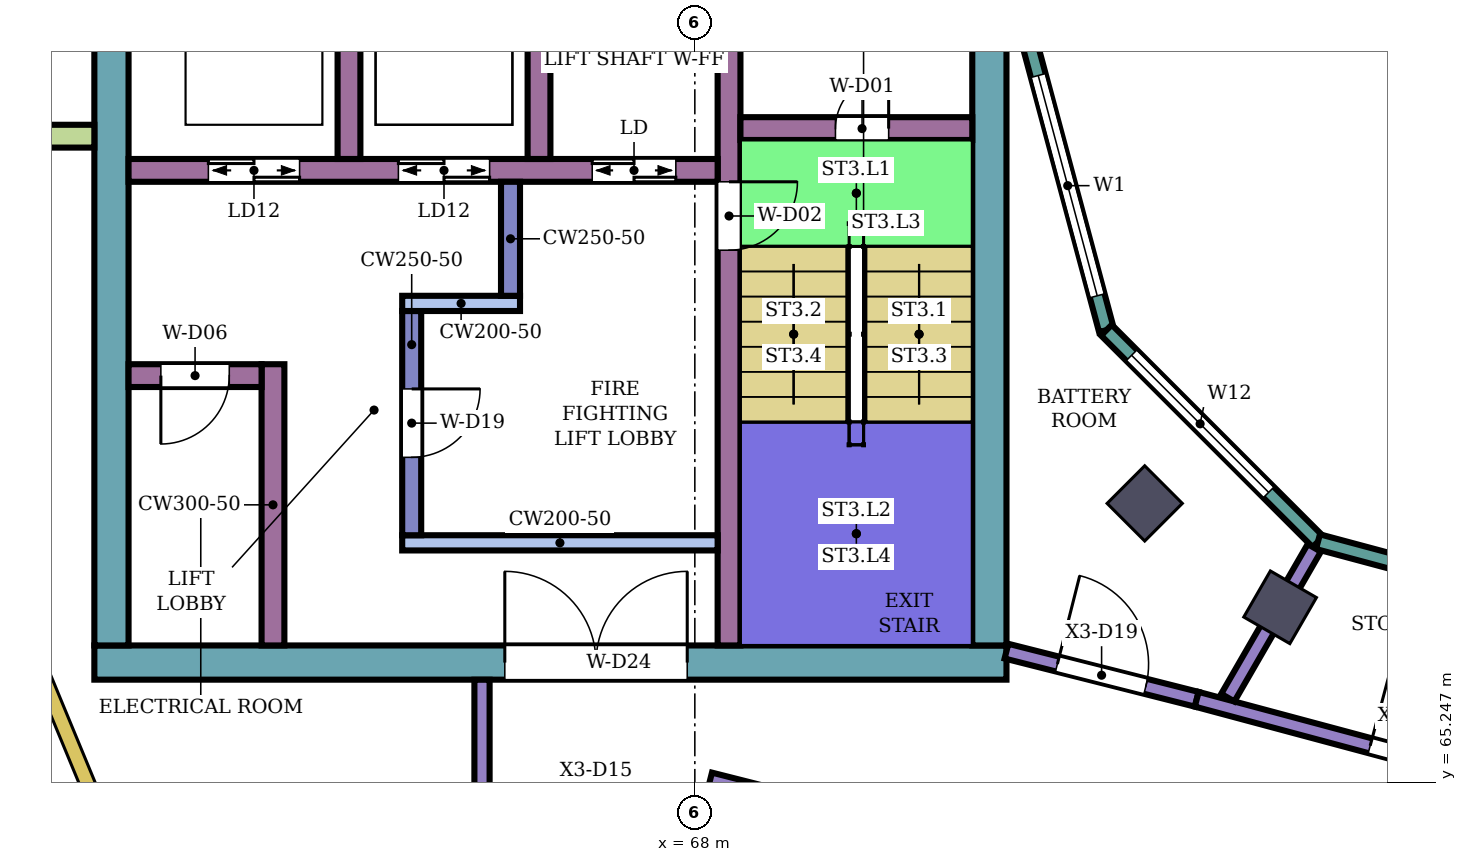
"""IFC4 building model, lengths in metres.
Left out: names, types, materials, properties, quantities, classifications, styles, units other than length and angle.
Written with IfcOpenShell. Run it as: python <this file> out.ifc"""

import sys

from ifc_helpers import new_model, si_unit, direction, frame, frame_2d, origin, origin_2d, place, context, subcontext, project, spatial, rectangle, extrude, element, fill, save


model = new_model("IFC4")
c1 = context("Model", 3, precision=1e-05, world=origin(), true_north=direction((0.0, 1.0)))
c2 = subcontext(c1, "Body", "Model", "MODEL_VIEW")
j1 = project(units=[si_unit("LENGTHUNIT", "METRE"), si_unit("PLANEANGLEUNIT", "RADIAN")], contexts=[c1])
p1 = place(None, origin())
s1 = spatial("IfcSite", under=j1, at=p1, CompositionType="ELEMENT")
p2 = place(p1, origin())
s2 = spatial("IfcBuilding", under=s1, at=p2, CompositionType="ELEMENT")
p3 = place(p2, frame((0.0, 0.0, 309.3)))
s3 = spatial("IfcBuildingStorey", under=s2, at=p3, CompositionType="ELEMENT", Elevation=309.3)
for number, where, z_axis, x_axis in (
    (1, (73.919, 68.919, 0.0), (0.0, 0.0, 1.0), (-0.707, -0.707, 0.0)),
    (2, (75.7, 67.552, 0.0), (0.0, 0.0, 1.0), (-0.5, -0.866, 0.0)),
):
    element("IfcColumn", number, at=place(p3, frame(where, z_axis=z_axis, x_axis=x_axis)), inside=s3, PredefinedType="COLUMN", context=c2, shape_type="SweptSolid", body=[
        extrude(rectangle(XDim=0.7, YDim=0.7, at=origin_2d()), origin(), (0.0, 0.0, 1.0), 5.6),
    ])
p4 = place(p3, frame((72.1, 66.825, 0.0), z_axis=(0.0, 0.0, 1.0), x_axis=(-1.0, 0.0, 0.0)))
e3 = element("IfcWall", 3, at=p4, inside=s3, PredefinedType="SHEAR", context=c2, shape_type="SweptSolid", body=[
    extrude(rectangle(XDim=12.0, YDim=0.45, at=frame_2d((6.0, 0.0))), origin(), (0.0, 0.0, 1.0), 5.28),
])
p5 = place(p4, frame((4.2, 0.0, 0.0)))
e4 = element("IfcOpeningElement", 4, at=p5, cuts=e3, PredefinedType="OPENING", context=c2, shape_type="SweptSolid", body=[
    extrude(rectangle(XDim=2.4, YDim=2.4, at=frame_2d((1.2, 1.2))), frame((0.0, 0.235, 0.0), z_axis=(0.0, -1.0, 0.0), x_axis=(1.0, 0.0, 0.0)), (0.0, 0.0, 1.0), 0.47),
])
p6 = place(p3, frame((71.875, 75.0, 0.0), z_axis=(0.0, 0.0, 1.0), x_axis=(0.0, -1.0, 0.0)))
e5 = element("IfcWall", 5, at=p6, inside=s3, PredefinedType="SHEAR", context=c2, shape_type="SweptSolid", body=[
    extrude(rectangle(XDim=7.95, YDim=0.45, at=frame_2d((3.975, 0.0))), origin(), (0.0, 0.0, 1.0), 5.28),
])
p7 = place(p3, frame((60.325, 76.4, 0.0), z_axis=(0.0, 0.0, 1.0), x_axis=(0.0, -1.0, 0.0)))
e6 = element("IfcWall", 6, at=p7, inside=s3, PredefinedType="SHEAR", context=c2, shape_type="SweptSolid", body=[
    extrude(rectangle(XDim=9.35, YDim=0.45, at=frame_2d((4.675, 0.0))), origin(), (0.0, 0.0, 1.0), 5.28),
])
p8 = place(p3, frame((68.45, 75.0, 0.0), z_axis=(0.0, 0.0, 1.0), x_axis=(0.0, -1.0, 0.0)))
e7 = element("IfcWall", 7, at=p8, inside=s3, PredefinedType="SHEAR", context=c2, shape_type="SweptSolid", body=[
    extrude(rectangle(XDim=7.95, YDim=0.3, at=frame_2d((3.975, 0.0))), origin(), (0.0, 0.0, 1.0), 5.28),
])
p9 = place(p8, frame((1.85, 0.0, 0.0)))
e8 = element("IfcOpeningElement", 8, at=p9, cuts=e7, PredefinedType="OPENING", context=c2, shape_type="SweptSolid", body=[
    extrude(rectangle(XDim=0.9, YDim=2.1, at=frame_2d((0.45, 1.05))), frame((0.0, 0.16, 0.0), z_axis=(0.0, -1.0, 0.0), x_axis=(1.0, 0.0, 0.0)), (0.0, 0.0, 1.0), 0.32),
])
p10 = place(p3, frame((71.65, 73.85, 0.0), z_axis=(0.0, 0.0, 1.0), x_axis=(-1.0, 0.0, 0.0)))
e9 = element("IfcWall", 9, at=p10, inside=s3, PredefinedType="SHEAR", context=c2, shape_type="SweptSolid", body=[
    extrude(rectangle(XDim=3.05, YDim=0.3, at=frame_2d((1.525, 0.0))), origin(), (0.0, 0.0, 1.0), 5.28),
])
p11 = place(p10, frame((1.1, 0.0, 0.0)))
e10 = element("IfcOpeningElement", 10, at=p11, cuts=e9, PredefinedType="OPENING", context=c2, shape_type="SweptSolid", body=[
    extrude(rectangle(XDim=0.7, YDim=2.0, at=frame_2d((0.35, 1.0))), frame((0.0, 0.16, 0.0), z_axis=(0.0, -1.0, 0.0), x_axis=(1.0, 0.0, 0.0)), (0.0, 0.0, 1.0), 0.32),
])
p12 = place(p3, frame((68.3, 73.3, 0.0), z_axis=(0.0, 0.0, 1.0), x_axis=(-1.0, 0.0, 0.0)))
e11 = element("IfcWall", 11, at=p12, inside=s3, PredefinedType="SHEAR", context=c2, shape_type="SweptSolid", body=[
    extrude(rectangle(XDim=7.75, YDim=0.3, at=frame_2d((3.875, 0.0))), origin(), (0.0, 0.0, 1.0), 5.28),
])
p13 = place(p12, frame((0.55, 0.0, 0.0)))
e12 = element("IfcOpeningElement", 12, at=p13, cuts=e11, PredefinedType="OPENING", context=c2, shape_type="SweptSolid", body=[
    extrude(rectangle(XDim=1.1, YDim=2.1, at=frame_2d((0.55, 1.05))), frame((0.0, 0.16, 0.0), z_axis=(0.0, -1.0, 0.0), x_axis=(1.0, 0.0, 0.0)), (0.0, 0.0, 1.0), 0.32),
])
p14 = place(p12, frame((3.0, 0.0, 0.0)))
e13 = element("IfcOpeningElement", 13, at=p14, cuts=e11, PredefinedType="OPENING", context=c2, shape_type="SweptSolid", body=[
    extrude(rectangle(XDim=1.2, YDim=2.1, at=frame_2d((0.6, 1.05))), frame((0.0, 0.16, 0.0), z_axis=(0.0, -1.0, 0.0), x_axis=(1.0, 0.0, 0.0)), (0.0, 0.0, 1.0), 0.32),
])
p15 = place(p12, frame((5.5, 0.0, 0.0)))
e14 = element("IfcOpeningElement", 14, at=p15, cuts=e11, PredefinedType="OPENING", context=c2, shape_type="SweptSolid", body=[
    extrude(rectangle(XDim=1.2, YDim=2.1, at=frame_2d((0.6, 1.05))), frame((0.0, 0.16, 0.0), z_axis=(0.0, -1.0, 0.0), x_axis=(1.0, 0.0, 0.0)), (0.0, 0.0, 1.0), 0.32),
])
for number, where, z_axis, x_axis in (
    (15, (65.95, 76.0, 0.0), (0.0, 0.0, 1.0), (0.0, -1.0, 0.0)),
    (16, (63.45, 76.0, 0.0), (0.0, 0.0, 1.0), (0.0, -1.0, 0.0)),
):
    element("IfcWall", number, at=place(p3, frame(where, z_axis=z_axis, x_axis=x_axis)), inside=s3, PredefinedType="SHEAR", context=c2, shape_type="SweptSolid", body=[
        extrude(rectangle(XDim=2.55, YDim=0.3, at=frame_2d((1.275, 0.0))), origin(), (0.0, 0.0, 1.0), 5.28),
    ])
p16 = place(p3, frame((68.3, 68.4, 0.0), z_axis=(0.0, 0.0, 1.0), x_axis=(-1.0, 0.0, 0.0)))
e17 = element("IfcWall", 17, at=p16, inside=s3, PredefinedType="SHEAR", context=c2, shape_type="SweptSolid", body=[
    extrude(rectangle(XDim=4.15, YDim=0.2, at=frame_2d((2.075, 0.0))), origin(), (0.0, 0.0, 1.0), 5.28),
])
p17 = place(p3, frame((64.275, 71.45, 0.0), z_axis=(0.0, 0.0, 1.0), x_axis=(0.0, -1.0, 0.0)))
e18 = element("IfcWall", 18, at=p17, inside=s3, PredefinedType="SHEAR", context=c2, shape_type="SweptSolid", body=[
    extrude(rectangle(XDim=2.95, YDim=0.25, at=frame_2d((1.475, 0.0))), origin(), (0.0, 0.0, 1.0), 5.28),
])
p18 = place(p17, frame((1.025, 0.0, 0.0)))
e19 = element("IfcOpeningElement", 19, at=p18, cuts=e18, PredefinedType="OPENING", context=c2, shape_type="SweptSolid", body=[
    extrude(rectangle(XDim=0.9, YDim=2.1, at=frame_2d((0.45, 1.05))), frame((0.0, 0.135, 0.0), z_axis=(0.0, -1.0, 0.0), x_axis=(1.0, 0.0, 0.0)), (0.0, 0.0, 1.0), 0.27),
])
p19 = place(p3, frame((65.7, 71.55, 0.0), z_axis=(0.0, 0.0, 1.0), x_axis=(-1.0, 0.0, 0.0)))
e20 = element("IfcWall", 20, at=p19, inside=s3, PredefinedType="SHEAR", context=c2, shape_type="SweptSolid", body=[
    extrude(rectangle(XDim=1.55, YDim=0.2, at=frame_2d((0.775, 0.0))), origin(), (0.0, 0.0, 1.0), 5.28),
])
p20 = place(p3, frame((65.575, 73.15, 0.0), z_axis=(0.0, 0.0, 1.0), x_axis=(0.0, -1.0, 0.0)))
e21 = element("IfcWall", 21, at=p20, inside=s3, PredefinedType="SHEAR", context=c2, shape_type="SweptSolid", body=[
    extrude(rectangle(XDim=1.5, YDim=0.25, at=frame_2d((0.75, 0.0))), origin(), (0.0, 0.0, 1.0), 5.28),
])
p21 = place(p3, frame((62.45, 70.75, 0.0), z_axis=(0.0, 0.0, 1.0), x_axis=(0.0, -1.0, 0.0)))
e22 = element("IfcWall", 22, at=p21, inside=s3, PredefinedType="SHEAR", context=c2, shape_type="SweptSolid", body=[
    extrude(rectangle(XDim=3.7, YDim=0.3, at=frame_2d((1.85, 0.0))), origin(), (0.0, 0.0, 1.0), 5.28),
])
p22 = place(p3, frame((62.3, 70.6, 0.0), z_axis=(0.0, 0.0, 1.0), x_axis=(-1.0, 0.0, 0.0)))
e23 = element("IfcWall", 23, at=p22, inside=s3, PredefinedType="SHEAR", context=c2, shape_type="SweptSolid", body=[
    extrude(rectangle(XDim=1.75, YDim=0.3, at=frame_2d((0.875, 0.0))), origin(), (0.0, 0.0, 1.0), 5.28),
])
p23 = place(p22, frame((0.425, 0.0, 0.0)))
e24 = element("IfcOpeningElement", 24, at=p23, cuts=e23, PredefinedType="OPENING", context=c2, shape_type="SweptSolid", body=[
    extrude(rectangle(XDim=0.9, YDim=2.1, at=frame_2d((0.45, 1.05))), frame((0.0, 0.16, 0.0), z_axis=(0.0, -1.0, 0.0), x_axis=(1.0, 0.0, 0.0)), (0.0, 0.0, 1.0), 0.32),
])
p24 = place(p3, frame((60.1, 73.75, 0.0), z_axis=(0.0, 0.0, 1.0), x_axis=(-1.0, 0.0, 0.0)))
e25 = element("IfcWall", 25, at=p24, inside=s3, PredefinedType="NOTDEFINED", context=c2, shape_type="SweptSolid", body=[
    extrude(rectangle(XDim=2.416, YDim=0.3, at=frame_2d((1.208, 0.0))), origin(), (0.0, 0.0, 1.0), 5.6),
])
p25 = place(p3, frame((72.396, 75.0, 0.0), z_axis=(0.0, 0.0, 1.0), x_axis=(0.258789828301, -0.965933654434, 0.0)))
e26 = element("IfcWall", 26, at=p25, inside=s3, PredefinedType="NOTDEFINED", context=c2, shape_type="SweptSolid", body=[
    extrude(rectangle(XDim=3.936, YDim=0.2, at=frame_2d((1.968, 0.0))), origin(), (0.0, 0.0, 1.0), 5.6),
])
p26 = place(p25, frame((0.468, 0.0, 0.9)))
e27 = element("IfcOpeningElement", 27, at=p26, cuts=e26, PredefinedType="OPENING", context=c2, shape_type="SweptSolid", body=[
    extrude(rectangle(XDim=3.0, YDim=2.3, at=frame_2d((1.5, 1.15))), frame((0.0, 0.11, 0.0), z_axis=(0.0, -1.0, 0.0), x_axis=(1.0, 0.0, 0.0)), (0.0, 0.0, 1.0), 0.22),
])
p27 = place(p3, frame((73.415, 71.198, 0.0), z_axis=(0.0, 0.0, 1.0), x_axis=(0.707106781187, -0.707106781187, 0.0)))
e28 = element("IfcWall", 28, at=p27, inside=s3, PredefinedType="NOTDEFINED", context=c2, shape_type="SweptSolid", body=[
    extrude(rectangle(XDim=3.936, YDim=0.2, at=frame_2d((1.968, 0.0))), origin(), (0.0, 0.0, 1.0), 5.6),
])
p28 = place(p27, frame((0.468, 0.0, 0.9)))
e29 = element("IfcOpeningElement", 29, at=p28, cuts=e28, PredefinedType="OPENING", context=c2, shape_type="SweptSolid", body=[
    extrude(rectangle(XDim=2.55, YDim=2.3, at=frame_2d((1.275, 1.15))), frame((0.0, 0.11, 0.0), z_axis=(0.0, -1.0, 0.0), x_axis=(1.0, 0.0, 0.0)), (0.0, 0.0, 1.0), 0.22),
])
p29 = place(p3, frame((76.198, 68.415, 0.0), z_axis=(0.0, 0.0, 1.0), x_axis=(0.965933654434, -0.258789828301, 0.0)))
e30 = element("IfcWall", 30, at=p29, inside=s3, PredefinedType="NOTDEFINED", context=c2, shape_type="SweptSolid", body=[
    extrude(rectangle(XDim=3.936, YDim=0.2, at=frame_2d((1.968, 0.0))), origin(), (0.0, 0.0, 1.0), 5.6),
])
p30 = place(p29, frame((2.118, 0.0, 0.9)))
e31 = element("IfcOpeningElement", 31, at=p30, cuts=e30, PredefinedType="OPENING", context=c2, shape_type="SweptSolid", body=[
    extrude(rectangle(XDim=1.35, YDim=2.3, at=frame_2d((0.675, 1.15))), frame((0.0, 0.11, 0.0), z_axis=(0.0, -1.0, 0.0), x_axis=(1.0, 0.0, 0.0)), (0.0, 0.0, 1.0), 0.22),
])
p31 = place(p3, frame((65.2, 65.2, 0.0), z_axis=(0.0, 0.0, 1.0), x_axis=(0.0, 1.0, 0.0)))
e32 = element("IfcWall", 32, at=p31, inside=s3, PredefinedType="PARTITIONING", context=c2, shape_type="SweptSolid", body=[
    extrude(rectangle(XDim=1.399, YDim=0.2, at=frame_2d((0.7, 0.0))), origin(), (0.0, 0.0, 1.0), 5.15),
])
p32 = place(p3, frame((68.201, 65.28, 0.0), z_axis=(0.0, 0.0, 1.0), x_axis=(0.969440682923, -0.245325828836, 0.0)))
e33 = element("IfcWall", 33, at=p32, inside=s3, PredefinedType="PARTITIONING", context=c2, shape_type="SweptSolid", body=[
    extrude(rectangle(XDim=5.927, YDim=0.2, at=frame_2d((2.964, 0.0))), origin(), (0.0, 0.0, 1.0), 5.15),
])
p33 = place(p32, frame((3.258, 0.0, 0.0)))
e34 = element("IfcOpeningElement", 34, at=p33, cuts=e33, PredefinedType="OPENING", context=c2, shape_type="SweptSolid", body=[
    extrude(rectangle(XDim=1.1, YDim=2.1, at=frame_2d((0.55, 1.05))), frame((0.0, 0.11, 0.0), z_axis=(0.0, -1.0, 0.0), x_axis=(1.0, 0.0, 0.0)), (0.0, 0.0, 1.0), 0.22),
])
p34 = place(p3, frame((72.1, 66.975, 0.0), z_axis=(0.0, 0.0, 1.0), x_axis=(0.969471314457, -0.245204752086, 0.0)))
e35 = element("IfcWall", 35, at=p34, inside=s3, PredefinedType="PARTITIONING", context=c2, shape_type="SweptSolid", body=[
    extrude(rectangle(XDim=2.582, YDim=0.2, at=frame_2d((1.291, 0.0))), origin(), (0.0, 0.0, 1.0), 5.15),
])
p35 = place(p34, frame((0.691, 0.0, 0.0)))
e36 = element("IfcOpeningElement", 36, at=p35, cuts=e35, PredefinedType="OPENING", context=c2, shape_type="SweptSolid", body=[
    extrude(rectangle(XDim=1.2, YDim=2.4, at=frame_2d((0.6, 1.2))), frame((0.0, 0.11, 0.0), z_axis=(0.0, -1.0, 0.0), x_axis=(1.0, 0.0, 0.0)), (0.0, 0.0, 1.0), 0.22),
])
p36 = place(p3, frame((74.603, 66.342, 0.0), z_axis=(0.0, 0.0, 1.0), x_axis=(0.965920893652, -0.258837453254, 0.0)))
e37 = element("IfcWall", 37, at=p36, inside=s3, PredefinedType="PARTITIONING", context=c2, shape_type="SweptSolid", body=[
    extrude(rectangle(XDim=5.458, YDim=0.2, at=frame_2d((2.729, 0.0))), origin(), (0.0, 0.0, 1.0), 5.15),
])
p37 = place(p36, frame((2.362, 0.0, 0.0)))
e38 = element("IfcOpeningElement", 38, at=p37, cuts=e37, PredefinedType="OPENING", context=c2, shape_type="SweptSolid", body=[
    extrude(rectangle(XDim=1.2, YDim=2.4, at=frame_2d((0.6, 1.2))), frame((0.0, 0.11, 0.0), z_axis=(0.0, -1.0, 0.0), x_axis=(1.0, 0.0, 0.0)), (0.0, 0.0, 1.0), 0.22),
])
p38 = place(p3, frame((75.012, 66.363, 0.0), z_axis=(0.0, 0.0, 1.0), x_axis=(0.500143511652, 0.865942531438, 0.0)))
e39 = element("IfcWall", 39, at=p38, inside=s3, PredefinedType="PARTITIONING", context=c2, shape_type="SweptSolid", body=[
    extrude(rectangle(XDim=2.275, YDim=0.2, at=frame_2d((1.138, 0.0))), origin(), (0.0, 0.0, 1.0), 5.15),
])
p39 = place(p26, origin())
e40 = element("IfcWindow", 40, at=p39, inside=s3, PartitioningType="SINGLE_PANEL", PredefinedType="WINDOW", context=c2, shape_type="SweptSolid", body=[
    extrude(rectangle(XDim=3.0, YDim=2.3, at=frame_2d((1.5, 1.15))), frame((0.0, 0.03, 0.0), z_axis=(0.0, -1.0, 0.0), x_axis=(1.0, 0.0, 0.0)), (0.0, 0.0, 1.0), 0.06),
])
fill(e27, e40)
p40 = place(p28, origin())
e41 = element("IfcWindow", 41, at=p40, inside=s3, PartitioningType="SINGLE_PANEL", PredefinedType="WINDOW", context=c2, shape_type="SweptSolid", body=[
    extrude(rectangle(XDim=2.55, YDim=2.3, at=frame_2d((1.275, 1.15))), frame((0.0, 0.03, 0.0), z_axis=(0.0, -1.0, 0.0), x_axis=(1.0, 0.0, 0.0)), (0.0, 0.0, 1.0), 0.06),
])
fill(e29, e41)
p41 = place(p37, origin())
e42 = element("IfcDoor", 42, at=p41, inside=s3, OperationType="SINGLE_SWING_LEFT", PredefinedType="DOOR", context=c2, shape_type="SweptSolid", body=[
    extrude(rectangle(XDim=1.2, YDim=2.4, at=frame_2d((0.6, 1.2))), frame((0.0, 0.025, 0.0), z_axis=(0.0, -1.0, 0.0), x_axis=(1.0, 0.0, 0.0)), (0.0, 0.0, 1.0), 0.05),
])
fill(e38, e42)
p42 = place(p35, origin())
e43 = element("IfcDoor", 43, at=p42, inside=s3, OperationType="SINGLE_SWING_LEFT", PredefinedType="DOOR", context=c2, shape_type="SweptSolid", body=[
    extrude(rectangle(XDim=1.2, YDim=2.4, at=frame_2d((0.6, 1.2))), frame((0.0, 0.025, 0.0), z_axis=(0.0, -1.0, 0.0), x_axis=(1.0, 0.0, 0.0)), (0.0, 0.0, 1.0), 0.05),
])
fill(e36, e43)
p43 = place(p11, frame((0.7, 0.0, 0.0), z_axis=(0.0, 0.0, 1.0), x_axis=(-1.0, 0.0, 0.0)))
e44 = element("IfcDoor", 44, at=p43, inside=s3, OperationType="SINGLE_SWING_RIGHT", PredefinedType="DOOR", context=c2, shape_type="SweptSolid", body=[
    extrude(rectangle(XDim=0.7, YDim=2.0, at=frame_2d((0.35, 1.0))), frame((0.0, 0.025, 0.0), z_axis=(0.0, -1.0, 0.0), x_axis=(1.0, 0.0, 0.0)), (0.0, 0.0, 1.0), 0.05),
])
fill(e10, e44)
p44 = place(p9, origin())
e45 = element("IfcDoor", 45, at=p44, inside=s3, OperationType="SINGLE_SWING_LEFT", PredefinedType="DOOR", context=c2, shape_type="SweptSolid", body=[
    extrude(rectangle(XDim=0.9, YDim=2.1, at=frame_2d((0.45, 1.05))), frame((0.0, 0.025, 0.0), z_axis=(0.0, -1.0, 0.0), x_axis=(1.0, 0.0, 0.0)), (0.0, 0.0, 1.0), 0.05),
])
fill(e8, e45)
p45 = place(p13, origin())
e46 = element("IfcDoor", 46, at=p45, inside=s3, OperationType="DOUBLE_DOOR_SLIDING", PredefinedType="DOOR", context=c2, shape_type="SweptSolid", body=[
    extrude(rectangle(XDim=1.1, YDim=2.1, at=frame_2d((0.55, 1.05))), frame((0.0, 0.025, 0.0), z_axis=(0.0, -1.0, 0.0), x_axis=(1.0, 0.0, 0.0)), (0.0, 0.0, 1.0), 0.05),
])
fill(e12, e46)
p46 = place(p14, origin())
e47 = element("IfcDoor", 47, at=p46, inside=s3, OperationType="DOUBLE_DOOR_SLIDING", PredefinedType="DOOR", context=c2, shape_type="SweptSolid", body=[
    extrude(rectangle(XDim=1.2, YDim=2.1, at=frame_2d((0.6, 1.05))), frame((0.0, 0.025, 0.0), z_axis=(0.0, -1.0, 0.0), x_axis=(1.0, 0.0, 0.0)), (0.0, 0.0, 1.0), 0.05),
])
fill(e13, e47)
p47 = place(p15, origin())
e48 = element("IfcDoor", 48, at=p47, inside=s3, OperationType="DOUBLE_DOOR_SLIDING", PredefinedType="DOOR", context=c2, shape_type="SweptSolid", body=[
    extrude(rectangle(XDim=1.2, YDim=2.1, at=frame_2d((0.6, 1.05))), frame((0.0, 0.025, 0.0), z_axis=(0.0, -1.0, 0.0), x_axis=(1.0, 0.0, 0.0)), (0.0, 0.0, 1.0), 0.05),
])
fill(e14, e48)
p48 = place(p18, origin())
e49 = element("IfcDoor", 49, at=p48, inside=s3, OperationType="SINGLE_SWING_LEFT", PredefinedType="DOOR", context=c2, shape_type="SweptSolid", body=[
    extrude(rectangle(XDim=0.9, YDim=2.1, at=frame_2d((0.45, 1.05))), frame((0.0, 0.025, 0.0), z_axis=(0.0, -1.0, 0.0), x_axis=(1.0, 0.0, 0.0)), (0.0, 0.0, 1.0), 0.05),
])
fill(e19, e49)
p49 = place(p23, origin())
e50 = element("IfcDoor", 50, at=p49, inside=s3, OperationType="SINGLE_SWING_RIGHT", PredefinedType="DOOR", context=c2, shape_type="SweptSolid", body=[
    extrude(rectangle(XDim=0.9, YDim=2.1, at=frame_2d((0.45, 1.05))), frame((0.0, 0.025, 0.0), z_axis=(0.0, -1.0, 0.0), x_axis=(1.0, 0.0, 0.0)), (0.0, 0.0, 1.0), 0.05),
])
fill(e24, e50)
p50 = place(p5, frame((2.4, 0.0, 0.0), z_axis=(0.0, 0.0, 1.0), x_axis=(-1.0, 0.0, 0.0)))
e51 = element("IfcDoor", 51, at=p50, inside=s3, OperationType="DOUBLE_DOOR_SINGLE_SWING", PredefinedType="DOOR", context=c2, shape_type="SweptSolid", body=[
    extrude(rectangle(XDim=2.4, YDim=2.4, at=frame_2d((1.2, 1.2))), frame((0.0, 0.025, 0.0), z_axis=(0.0, -1.0, 0.0), x_axis=(1.0, 0.0, 0.0)), (0.0, 0.0, 1.0), 0.05),
])
fill(e4, e51)
save(model, sys.argv[1])
